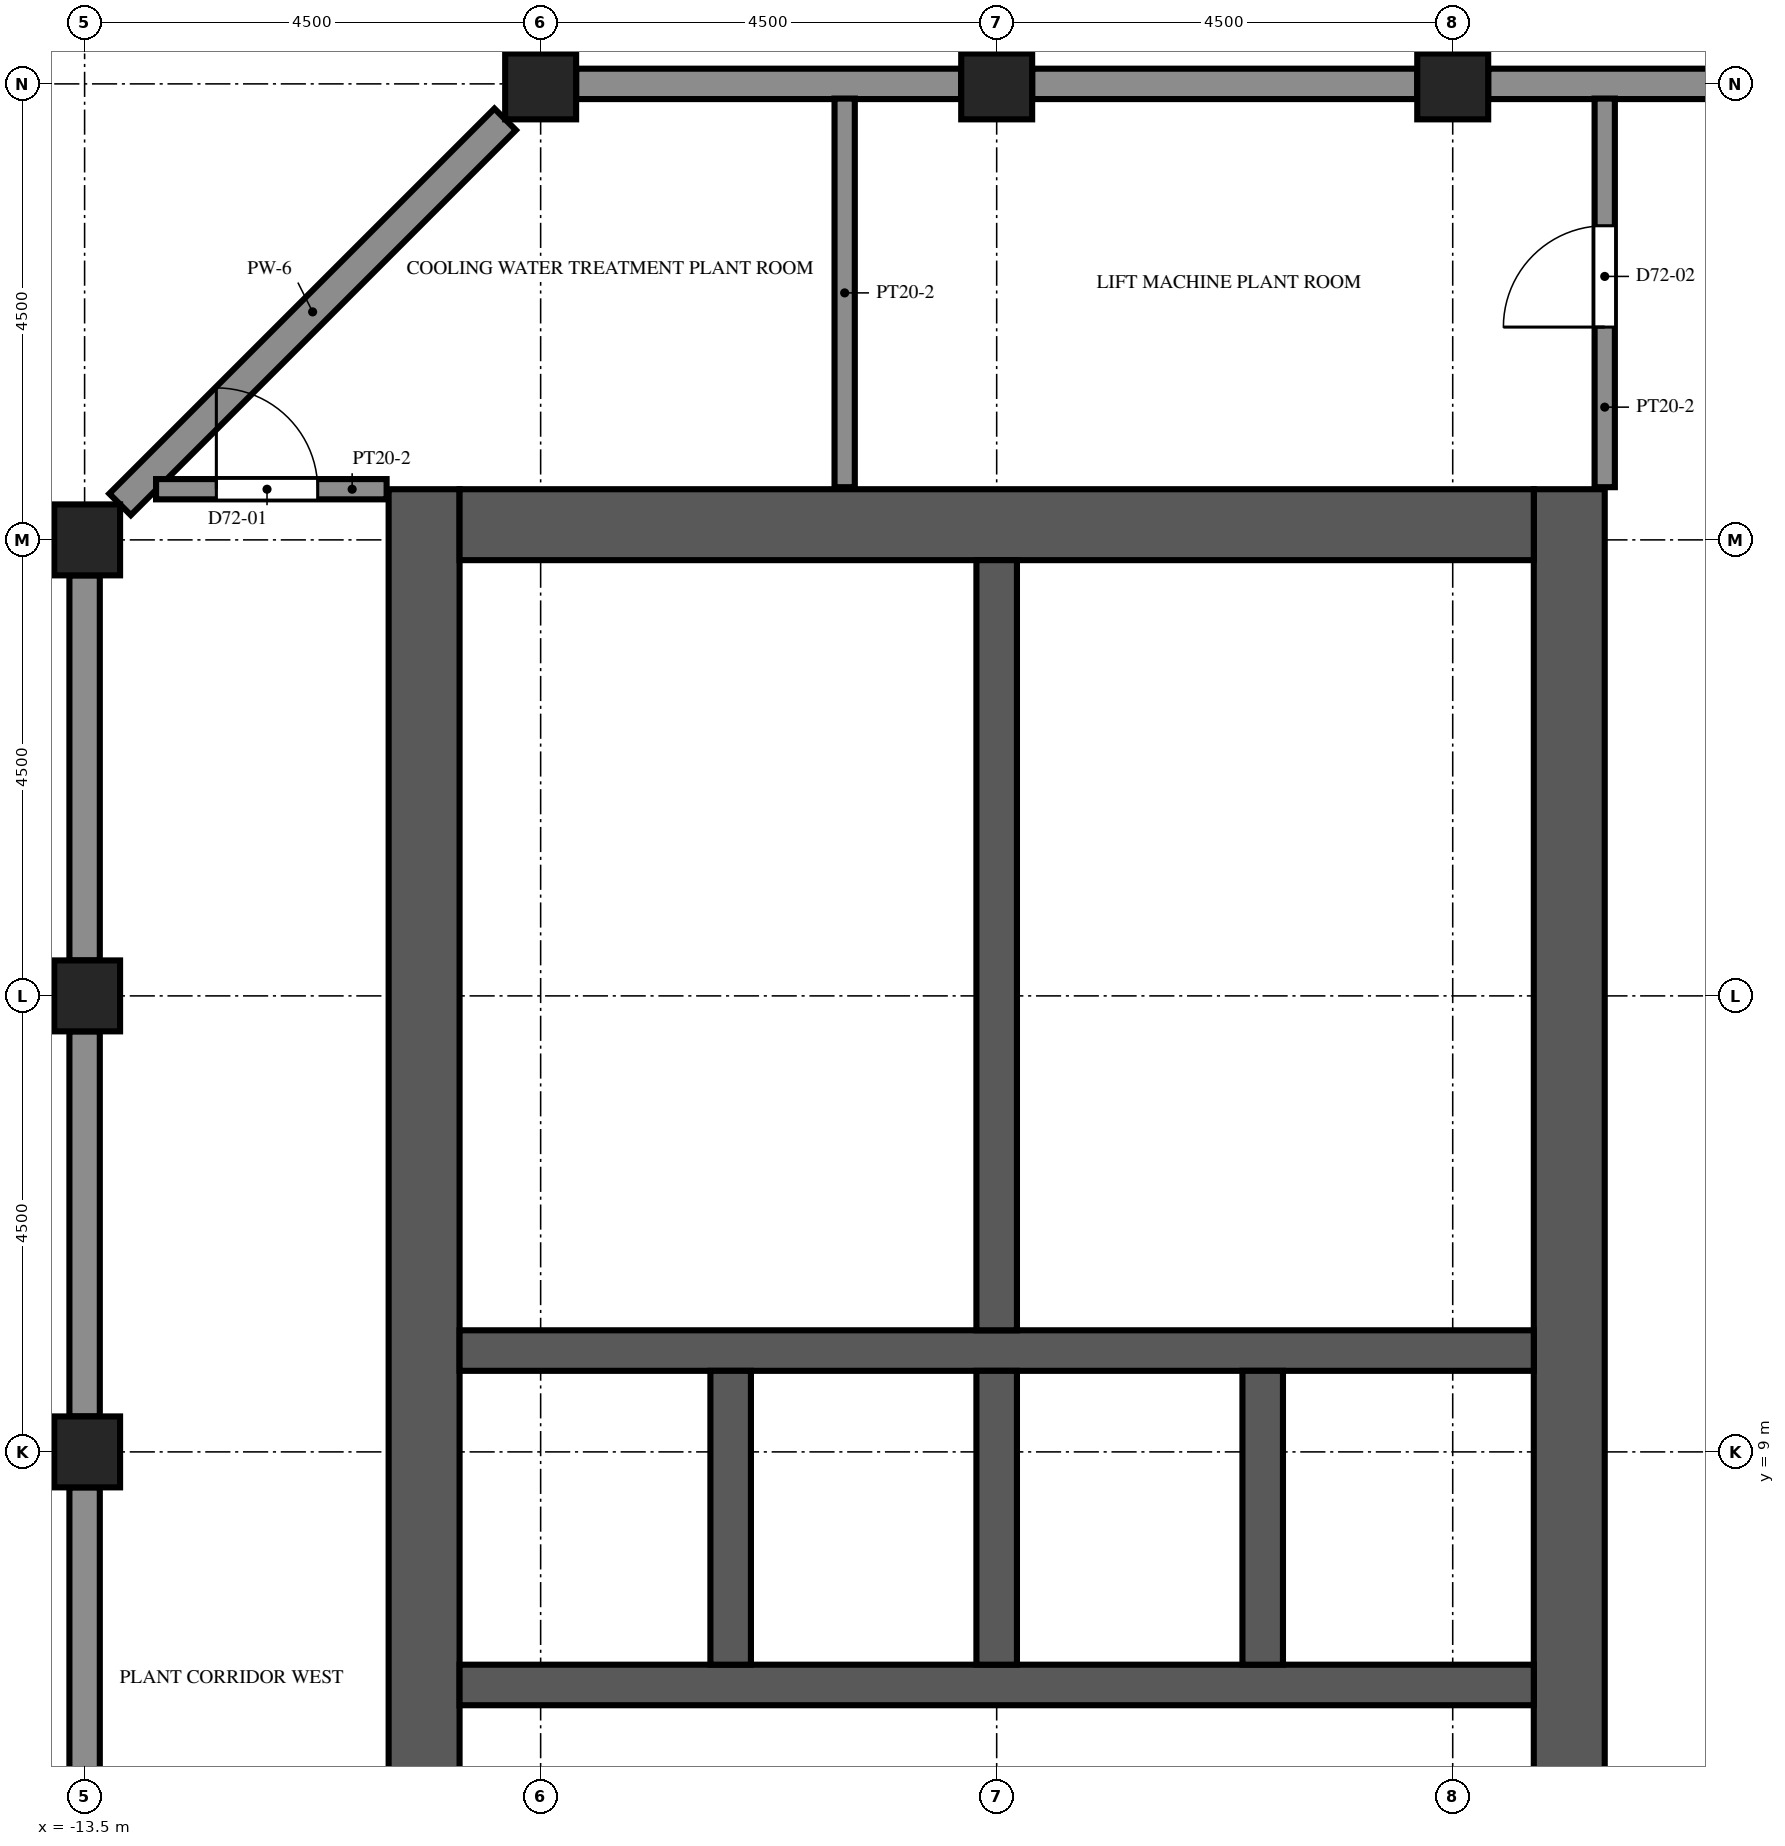
"""IFC4 building model, lengths in metres.
Left out: names, types, materials, properties, quantities, classifications, styles, units other than length and angle.
Written with IfcOpenShell. Run it as: python <this file> out.ifc"""

import sys

from ifc_helpers import new_model, si_unit, direction, frame, frame_2d, origin, origin_2d, place, context, subcontext, project, spatial, rectangle, extrude, element, fill, save


model = new_model("IFC4")
c1 = context("Model", 3, precision=1e-05, world=origin(), true_north=direction((0.0, 1.0)))
c2 = subcontext(c1, "Body", "Model", "MODEL_VIEW")
j1 = project(units=[si_unit("LENGTHUNIT", "METRE"), si_unit("PLANEANGLEUNIT", "RADIAN")], contexts=[c1])
p1 = place(None, origin())
s1 = spatial("IfcSite", under=j1, at=p1, CompositionType="ELEMENT")
p2 = place(p1, origin())
s2 = spatial("IfcBuilding", under=s1, at=p2, CompositionType="ELEMENT")
p3 = place(p2, frame((0.0, 0.0, 321.4)))
s3 = spatial("IfcBuildingStorey", under=s2, at=p3, CompositionType="ELEMENT", Elevation=321.4)
for number, where, z_axis, x_axis in (
    (1, (-13.5, 9.0, 0.0), (0.0, 0.0, 1.0), (1.0, 0.0, 0.0)),
    (2, (-13.5, 13.5, 0.0), (0.0, 0.0, 1.0), (1.0, 0.0, 0.0)),
    (3, (-13.5, 18.0, 0.0), (0.0, 0.0, 1.0), (1.0, 0.0, 0.0)),
    (4, (-9.0, 22.5, 0.0), (0.0, 0.0, 1.0), (1.0, 0.0, 0.0)),
    (5, (-4.5, 22.5, 0.0), (0.0, 0.0, 1.0), (1.0, 0.0, 0.0)),
    (6, (0.0, 22.5, 0.0), (0.0, 0.0, 1.0), (1.0, 0.0, 0.0)),
):
    element("IfcColumn", number, at=place(p3, frame(where, z_axis=z_axis, x_axis=x_axis)), inside=s3, PredefinedType="COLUMN", context=c2, shape_type="SweptSolid", body=[
        extrude(rectangle(XDim=0.7, YDim=0.7, at=origin_2d()), origin(), (0.0, 0.0, 1.0), 4.8),
    ])
p4 = place(p3, frame((-10.15, -9.0, 0.0), z_axis=(0.0, 0.0, 1.0), x_axis=(0.0, 1.0, 0.0)))
e7 = element("IfcWall", 7, at=p4, inside=s3, PredefinedType="SHEAR", context=c2, shape_type="SweptSolid", body=[
    extrude(rectangle(XDim=27.5, YDim=0.7, at=frame_2d((13.75, 0.0))), origin(), (0.0, 0.0, 1.0), 4.8),
])
p5 = place(p4, frame((12.55, 0.0, 0.0)))
e8 = element("IfcOpeningElement", 8, at=p5, cuts=e7, PredefinedType="OPENING", context=c2, shape_type="SweptSolid", body=[
    extrude(rectangle(XDim=2.4, YDim=2.4, at=frame_2d((1.2, 1.2))), frame((0.0, 0.36, 0.0), z_axis=(0.0, -1.0, 0.0), x_axis=(1.0, 0.0, 0.0)), (0.0, 0.0, 1.0), 0.72),
])
p6 = place(p4, frame((6.825, 0.0, 0.0)))
e9 = element("IfcOpeningElement", 9, at=p6, cuts=e7, PredefinedType="OPENING", context=c2, shape_type="SweptSolid", body=[
    extrude(rectangle(XDim=1.2, YDim=2.1, at=frame_2d((0.6, 1.05))), frame((0.0, 0.36, 0.0), z_axis=(0.0, -1.0, 0.0), x_axis=(1.0, 0.0, 0.0)), (0.0, 0.0, 1.0), 0.72),
])
p7 = place(p4, frame((19.475, 0.0, 0.0)))
e10 = element("IfcOpeningElement", 10, at=p7, cuts=e7, PredefinedType="OPENING", context=c2, shape_type="SweptSolid", body=[
    extrude(rectangle(XDim=1.2, YDim=2.1, at=frame_2d((0.6, 1.05))), frame((0.0, 0.36, 0.0), z_axis=(0.0, -1.0, 0.0), x_axis=(1.0, 0.0, 0.0)), (0.0, 0.0, 1.0), 0.72),
])
p8 = place(p3, frame((1.15, -9.0, 0.0), z_axis=(0.0, 0.0, 1.0), x_axis=(0.0, 1.0, 0.0)))
e11 = element("IfcWall", 11, at=p8, inside=s3, PredefinedType="SHEAR", context=c2, shape_type="SweptSolid", body=[
    extrude(rectangle(XDim=27.5, YDim=0.7, at=frame_2d((13.75, 0.0))), origin(), (0.0, 0.0, 1.0), 4.8),
])
p9 = place(p8, frame((12.55, 0.0, 0.0)))
e12 = element("IfcOpeningElement", 12, at=p9, cuts=e11, PredefinedType="OPENING", context=c2, shape_type="SweptSolid", body=[
    extrude(rectangle(XDim=2.4, YDim=2.4, at=frame_2d((1.2, 1.2))), frame((0.0, 0.36, 0.0), z_axis=(0.0, -1.0, 0.0), x_axis=(1.0, 0.0, 0.0)), (0.0, 0.0, 1.0), 0.72),
])
p10 = place(p8, frame((5.42, 0.0, 0.0)))
e13 = element("IfcOpeningElement", 13, at=p10, cuts=e11, PredefinedType="OPENING", context=c2, shape_type="SweptSolid", body=[
    extrude(rectangle(XDim=1.2, YDim=2.1, at=frame_2d((0.6, 1.05))), frame((0.0, 0.36, 0.0), z_axis=(0.0, -1.0, 0.0), x_axis=(1.0, 0.0, 0.0)), (0.0, 0.0, 1.0), 0.72),
])
p11 = place(p8, frame((19.46, 0.0, 0.0)))
e14 = element("IfcOpeningElement", 14, at=p11, cuts=e11, PredefinedType="OPENING", context=c2, shape_type="SweptSolid", body=[
    extrude(rectangle(XDim=1.0, YDim=2.1, at=frame_2d((0.5, 1.05))), frame((0.0, 0.36, 0.0), z_axis=(0.0, -1.0, 0.0), x_axis=(1.0, 0.0, 0.0)), (0.0, 0.0, 1.0), 0.72),
])
p12 = place(p8, frame((21.17, 0.0, 0.0)))
e15 = element("IfcOpeningElement", 15, at=p12, cuts=e11, PredefinedType="OPENING", context=c2, shape_type="SweptSolid", body=[
    extrude(rectangle(XDim=1.0, YDim=2.1, at=frame_2d((0.5, 1.05))), frame((0.0, 0.36, 0.0), z_axis=(0.0, -1.0, 0.0), x_axis=(1.0, 0.0, 0.0)), (0.0, 0.0, 1.0), 0.72),
])
p13 = place(p8, frame((23.26, 0.0, 0.0)))
e16 = element("IfcOpeningElement", 16, at=p13, cuts=e11, PredefinedType="OPENING", context=c2, shape_type="SweptSolid", body=[
    extrude(rectangle(XDim=1.0, YDim=2.1, at=frame_2d((0.5, 1.05))), frame((0.0, 0.36, 0.0), z_axis=(0.0, -1.0, 0.0), x_axis=(1.0, 0.0, 0.0)), (0.0, 0.0, 1.0), 0.72),
])
p14 = place(p8, frame((25.35, 0.0, 0.0)))
e17 = element("IfcOpeningElement", 17, at=p14, cuts=e11, PredefinedType="OPENING", context=c2, shape_type="SweptSolid", body=[
    extrude(rectangle(XDim=1.0, YDim=2.1, at=frame_2d((0.5, 1.05))), frame((0.0, 0.36, 0.0), z_axis=(0.0, -1.0, 0.0), x_axis=(1.0, 0.0, 0.0)), (0.0, 0.0, 1.0), 0.72),
])
p15 = place(p3, frame((-9.8, 18.15, 0.0), z_axis=(0.0, 0.0, 1.0), x_axis=(1.0, 0.0, 0.0)))
e18 = element("IfcWall", 18, at=p15, inside=s3, PredefinedType="SHEAR", context=c2, shape_type="SweptSolid", body=[
    extrude(rectangle(XDim=10.6, YDim=0.7, at=frame_2d((5.3, 0.0))), origin(), (0.0, 0.0, 1.0), 4.8),
])
p16 = place(p3, frame((-9.8, 6.7, 0.0), z_axis=(0.0, 0.0, 1.0), x_axis=(1.0, 0.0, 0.0)))
e19 = element("IfcWall", 19, at=p16, inside=s3, PredefinedType="SHEAR", context=c2, shape_type="SweptSolid", body=[
    extrude(rectangle(XDim=10.6, YDim=0.4, at=frame_2d((5.3, 0.0))), origin(), (0.0, 0.0, 1.0), 4.8),
])
p17 = place(p16, frame((0.738, 0.0, 0.0)))
e20 = element("IfcOpeningElement", 20, at=p17, cuts=e19, PredefinedType="OPENING", context=c2, shape_type="SweptSolid", body=[
    extrude(rectangle(XDim=1.0, YDim=2.1, at=frame_2d((0.5, 1.05))), frame((0.0, 0.21, 0.0), z_axis=(0.0, -1.0, 0.0), x_axis=(1.0, 0.0, 0.0)), (0.0, 0.0, 1.0), 0.42),
])
p18 = place(p16, frame((3.488, 0.0, 0.0)))
e21 = element("IfcOpeningElement", 21, at=p18, cuts=e19, PredefinedType="OPENING", context=c2, shape_type="SweptSolid", body=[
    extrude(rectangle(XDim=1.0, YDim=2.1, at=frame_2d((0.5, 1.05))), frame((0.0, 0.21, 0.0), z_axis=(0.0, -1.0, 0.0), x_axis=(1.0, 0.0, 0.0)), (0.0, 0.0, 1.0), 0.42),
])
p19 = place(p16, frame((6.113, 0.0, 0.0)))
e22 = element("IfcOpeningElement", 22, at=p19, cuts=e19, PredefinedType="OPENING", context=c2, shape_type="SweptSolid", body=[
    extrude(rectangle(XDim=1.0, YDim=2.1, at=frame_2d((0.5, 1.05))), frame((0.0, 0.21, 0.0), z_axis=(0.0, -1.0, 0.0), x_axis=(1.0, 0.0, 0.0)), (0.0, 0.0, 1.0), 0.42),
])
p20 = place(p16, frame((8.863, 0.0, 0.0)))
e23 = element("IfcOpeningElement", 23, at=p20, cuts=e19, PredefinedType="OPENING", context=c2, shape_type="SweptSolid", body=[
    extrude(rectangle(XDim=1.0, YDim=2.1, at=frame_2d((0.5, 1.05))), frame((0.0, 0.21, 0.0), z_axis=(0.0, -1.0, 0.0), x_axis=(1.0, 0.0, 0.0)), (0.0, 0.0, 1.0), 0.42),
])
p21 = place(p3, frame((-9.8, 10.0, 0.0), z_axis=(0.0, 0.0, 1.0), x_axis=(1.0, 0.0, 0.0)))
e24 = element("IfcWall", 24, at=p21, inside=s3, PredefinedType="SHEAR", context=c2, shape_type="SweptSolid", body=[
    extrude(rectangle(XDim=10.6, YDim=0.4, at=frame_2d((5.3, 0.0))), origin(), (0.0, 0.0, 1.0), 4.8),
])
for number, where, z_axis, x_axis in (
    (25, (-7.125, 6.9, 0.0), (0.0, 0.0, 1.0), (0.0, 1.0, 0.0)),
    (26, (-4.5, 6.9, 0.0), (0.0, 0.0, 1.0), (0.0, 1.0, 0.0)),
    (27, (-1.875, 6.9, 0.0), (0.0, 0.0, 1.0), (0.0, 1.0, 0.0)),
):
    element("IfcWall", number, at=place(p3, frame(where, z_axis=z_axis, x_axis=x_axis)), inside=s3, PredefinedType="SHEAR", context=c2, shape_type="SweptSolid", body=[
        extrude(rectangle(XDim=2.9, YDim=0.4, at=frame_2d((1.45, 0.0))), origin(), (0.0, 0.0, 1.0), 4.8),
    ])
p22 = place(p3, frame((-4.5, 10.2, 0.0), z_axis=(0.0, 0.0, 1.0), x_axis=(0.0, 1.0, 0.0)))
e28 = element("IfcWall", 28, at=p22, inside=s3, PredefinedType="SHEAR", context=c2, shape_type="SweptSolid", body=[
    extrude(rectangle(XDim=7.6, YDim=0.4, at=frame_2d((3.8, 0.0))), origin(), (0.0, 0.0, 1.0), 4.8),
])
for number, where, z_axis, x_axis in (
    (29, (4.15, 22.5, 0.0), (0.0, 0.0, 1.0), (-1.0, 0.0, 0.0)),
    (30, (-0.35, 22.5, 0.0), (0.0, 0.0, 1.0), (-1.0, 0.0, 0.0)),
    (31, (-4.85, 22.5, 0.0), (0.0, 0.0, 1.0), (-1.0, 0.0, 0.0)),
):
    element("IfcWall", number, at=place(p3, frame(where, z_axis=z_axis, x_axis=x_axis)), inside=s3, PredefinedType="SOLIDWALL", context=c2, shape_type="SweptSolid", body=[
        extrude(rectangle(XDim=3.8, YDim=0.3, at=frame_2d((1.9, 0.0))), origin(), (0.0, 0.0, 1.0), 0.85),
    ])
p23 = place(p3, frame((-9.35, 22.15, 0.0), z_axis=(0.0, 0.0, 1.0), x_axis=(-0.707106781187, -0.707106781187, 0.0)))
e32 = element("IfcWall", 32, at=p23, inside=s3, PredefinedType="SOLIDWALL", context=c2, shape_type="SweptSolid", body=[
    extrude(rectangle(XDim=5.374, YDim=0.3, at=frame_2d((2.687, 0.0))), origin(), (0.0, 0.0, 1.0), 3.5),
])
for number, where, z_axis, x_axis in (
    (33, (-13.5, 17.65, 0.0), (0.0, 0.0, 1.0), (0.0, -1.0, 0.0)),
    (34, (-13.5, 13.15, 0.0), (0.0, 0.0, 1.0), (0.0, -1.0, 0.0)),
    (35, (-13.5, 8.65, 0.0), (0.0, 0.0, 1.0), (0.0, -1.0, 0.0)),
):
    element("IfcWall", number, at=place(p3, frame(where, z_axis=z_axis, x_axis=x_axis)), inside=s3, PredefinedType="SOLIDWALL", context=c2, shape_type="SweptSolid", body=[
        extrude(rectangle(XDim=3.8, YDim=0.3, at=frame_2d((1.9, 0.0))), origin(), (0.0, 0.0, 1.0), 0.85),
    ])
p24 = place(p3, frame((-12.795, 18.5, 0.0), z_axis=(0.0, 0.0, 1.0), x_axis=(1.0, 0.0, 0.0)))
e36 = element("IfcWall", 36, at=p24, inside=s3, PredefinedType="PARTITIONING", context=c2, shape_type="SweptSolid", body=[
    extrude(rectangle(XDim=2.275, YDim=0.2, at=frame_2d((1.137, 0.0))), origin(), (0.0, 0.0, 1.0), 4.2),
])
p25 = place(p24, frame((0.595, 0.0, 0.0)))
e37 = element("IfcOpeningElement", 37, at=p25, cuts=e36, PredefinedType="OPENING", context=c2, shape_type="SweptSolid", body=[
    extrude(rectangle(XDim=1.0, YDim=2.1, at=frame_2d((0.5, 1.05))), frame((0.0, 0.11, 0.0), z_axis=(0.0, -1.0, 0.0), x_axis=(1.0, 0.0, 0.0)), (0.0, 0.0, 1.0), 0.22),
])
p26 = place(p3, frame((-6.0, 22.355, 0.0), z_axis=(0.0, 0.0, 1.0), x_axis=(0.0, -1.0, 0.0)))
e38 = element("IfcWall", 38, at=p26, inside=s3, PredefinedType="PARTITIONING", context=c2, shape_type="SweptSolid", body=[
    extrude(rectangle(XDim=3.835, YDim=0.2, at=frame_2d((1.917, 0.0))), origin(), (0.0, 0.0, 1.0), 4.2),
])
p27 = place(p3, frame((1.5, 18.52, 0.0), z_axis=(0.0, 0.0, 1.0), x_axis=(0.0, 1.0, 0.0)))
e39 = element("IfcWall", 39, at=p27, inside=s3, PredefinedType="PARTITIONING", context=c2, shape_type="SweptSolid", body=[
    extrude(rectangle(XDim=3.835, YDim=0.2, at=frame_2d((1.917, 0.0))), origin(), (0.0, 0.0, 1.0), 4.2),
])
p28 = place(p27, frame((1.58, 0.0, 0.0)))
e40 = element("IfcOpeningElement", 40, at=p28, cuts=e39, PredefinedType="OPENING", context=c2, shape_type="SweptSolid", body=[
    extrude(rectangle(XDim=1.0, YDim=2.1, at=frame_2d((0.5, 1.05))), frame((0.0, 0.11, 0.0), z_axis=(0.0, -1.0, 0.0), x_axis=(1.0, 0.0, 0.0)), (0.0, 0.0, 1.0), 0.22),
])
for number, where, z_axis, x_axis in (
    (41, (-4.3, 11.72, 0.0), (0.0, 0.0, 1.0), (1.0, 0.0, 0.0)),
    (42, (-4.3, 13.62, 0.0), (0.0, 0.0, 1.0), (1.0, 0.0, 0.0)),
    (43, (-4.3, 15.9, 0.0), (0.0, 0.0, 1.0), (1.0, 0.0, 0.0)),
):
    element("IfcWall", number, at=place(p3, frame(where, z_axis=z_axis, x_axis=x_axis)), inside=s3, PredefinedType="PARTITIONING", context=c2, shape_type="SweptSolid", body=[
        extrude(rectangle(XDim=5.1, YDim=0.1, at=frame_2d((2.55, 0.0))), origin(), (0.0, 0.0, 1.0), 4.2),
    ])
p29 = place(p25, origin())
e44 = element("IfcDoor", 44, at=p29, inside=s3, OperationType="SINGLE_SWING_LEFT", PredefinedType="DOOR", context=c2, shape_type="SweptSolid", body=[
    extrude(rectangle(XDim=1.0, YDim=2.1, at=frame_2d((0.5, 1.05))), frame((0.0, 0.025, 0.0), z_axis=(0.0, -1.0, 0.0), x_axis=(1.0, 0.0, 0.0)), (0.0, 0.0, 1.0), 0.05),
])
fill(e37, e44)
p30 = place(p28, origin())
e45 = element("IfcDoor", 45, at=p30, inside=s3, OperationType="SINGLE_SWING_LEFT", PredefinedType="DOOR", context=c2, shape_type="SweptSolid", body=[
    extrude(rectangle(XDim=1.0, YDim=2.1, at=frame_2d((0.5, 1.05))), frame((0.0, 0.025, 0.0), z_axis=(0.0, -1.0, 0.0), x_axis=(1.0, 0.0, 0.0)), (0.0, 0.0, 1.0), 0.05),
])
fill(e40, e45)
p31 = place(p5, origin())
e46 = element("IfcDoor", 46, at=p31, inside=s3, OperationType="DOUBLE_DOOR_DOUBLE_SWING", PredefinedType="DOOR", context=c2, shape_type="SweptSolid", body=[
    extrude(rectangle(XDim=2.4, YDim=2.4, at=frame_2d((1.2, 1.2))), frame((0.0, 0.025, 0.0), z_axis=(0.0, -1.0, 0.0), x_axis=(1.0, 0.0, 0.0)), (0.0, 0.0, 1.0), 0.05),
])
fill(e8, e46)
p32 = place(p9, origin())
e47 = element("IfcDoor", 47, at=p32, inside=s3, OperationType="DOUBLE_DOOR_DOUBLE_SWING", PredefinedType="DOOR", context=c2, shape_type="SweptSolid", body=[
    extrude(rectangle(XDim=2.4, YDim=2.4, at=frame_2d((1.2, 1.2))), frame((0.0, 0.025, 0.0), z_axis=(0.0, -1.0, 0.0), x_axis=(1.0, 0.0, 0.0)), (0.0, 0.0, 1.0), 0.05),
])
fill(e12, e47)
p33 = place(p7, origin())
e48 = element("IfcDoor", 48, at=p33, inside=s3, OperationType="SINGLE_SWING_LEFT", PredefinedType="DOOR", context=c2, shape_type="SweptSolid", body=[
    extrude(rectangle(XDim=1.2, YDim=2.1, at=frame_2d((0.6, 1.05))), frame((0.0, 0.025, 0.0), z_axis=(0.0, -1.0, 0.0), x_axis=(1.0, 0.0, 0.0)), (0.0, 0.0, 1.0), 0.05),
])
fill(e10, e48)
p34 = place(p17, origin())
e49 = element("IfcDoor", 49, at=p34, inside=s3, OperationType="SINGLE_SWING_LEFT", PredefinedType="DOOR", context=c2, shape_type="SweptSolid", body=[
    extrude(rectangle(XDim=1.0, YDim=2.1, at=frame_2d((0.5, 1.05))), frame((0.0, 0.025, 0.0), z_axis=(0.0, -1.0, 0.0), x_axis=(1.0, 0.0, 0.0)), (0.0, 0.0, 1.0), 0.05),
])
fill(e20, e49)
p35 = place(p18, origin())
e50 = element("IfcDoor", 50, at=p35, inside=s3, OperationType="SINGLE_SWING_RIGHT", PredefinedType="DOOR", context=c2, shape_type="SweptSolid", body=[
    extrude(rectangle(XDim=1.0, YDim=2.1, at=frame_2d((0.5, 1.05))), frame((0.0, 0.025, 0.0), z_axis=(0.0, -1.0, 0.0), x_axis=(1.0, 0.0, 0.0)), (0.0, 0.0, 1.0), 0.05),
])
fill(e21, e50)
p36 = place(p19, origin())
e51 = element("IfcDoor", 51, at=p36, inside=s3, OperationType="SINGLE_SWING_LEFT", PredefinedType="DOOR", context=c2, shape_type="SweptSolid", body=[
    extrude(rectangle(XDim=1.0, YDim=2.1, at=frame_2d((0.5, 1.05))), frame((0.0, 0.025, 0.0), z_axis=(0.0, -1.0, 0.0), x_axis=(1.0, 0.0, 0.0)), (0.0, 0.0, 1.0), 0.05),
])
fill(e22, e51)
p37 = place(p20, origin())
e52 = element("IfcDoor", 52, at=p37, inside=s3, OperationType="SINGLE_SWING_RIGHT", PredefinedType="DOOR", context=c2, shape_type="SweptSolid", body=[
    extrude(rectangle(XDim=1.0, YDim=2.1, at=frame_2d((0.5, 1.05))), frame((0.0, 0.025, 0.0), z_axis=(0.0, -1.0, 0.0), x_axis=(1.0, 0.0, 0.0)), (0.0, 0.0, 1.0), 0.05),
])
fill(e23, e52)
p38 = place(p11, origin())
e53 = element("IfcDoor", 53, at=p38, inside=s3, OperationType="SINGLE_SWING_LEFT", PredefinedType="DOOR", context=c2, shape_type="SweptSolid", body=[
    extrude(rectangle(XDim=1.0, YDim=2.1, at=frame_2d((0.5, 1.05))), frame((0.0, 0.325, 0.0), z_axis=(0.0, -1.0, 0.0), x_axis=(1.0, 0.0, 0.0)), (0.0, 0.0, 1.0), 0.05),
])
fill(e14, e53)
p39 = place(p12, origin())
e54 = element("IfcDoor", 54, at=p39, inside=s3, OperationType="SINGLE_SWING_RIGHT", PredefinedType="DOOR", context=c2, shape_type="SweptSolid", body=[
    extrude(rectangle(XDim=1.0, YDim=2.1, at=frame_2d((0.5, 1.05))), frame((0.0, 0.325, 0.0), z_axis=(0.0, -1.0, 0.0), x_axis=(1.0, 0.0, 0.0)), (0.0, 0.0, 1.0), 0.05),
])
fill(e15, e54)
p40 = place(p13, origin())
e55 = element("IfcDoor", 55, at=p40, inside=s3, OperationType="SINGLE_SWING_LEFT", PredefinedType="DOOR", context=c2, shape_type="SweptSolid", body=[
    extrude(rectangle(XDim=1.0, YDim=2.1, at=frame_2d((0.5, 1.05))), frame((0.0, 0.325, 0.0), z_axis=(0.0, -1.0, 0.0), x_axis=(1.0, 0.0, 0.0)), (0.0, 0.0, 1.0), 0.05),
])
fill(e16, e55)
p41 = place(p14, origin())
e56 = element("IfcDoor", 56, at=p41, inside=s3, OperationType="SINGLE_SWING_RIGHT", PredefinedType="DOOR", context=c2, shape_type="SweptSolid", body=[
    extrude(rectangle(XDim=1.0, YDim=2.1, at=frame_2d((0.5, 1.05))), frame((0.0, 0.325, 0.0), z_axis=(0.0, -1.0, 0.0), x_axis=(1.0, 0.0, 0.0)), (0.0, 0.0, 1.0), 0.05),
])
fill(e17, e56)
save(model, sys.argv[1])
